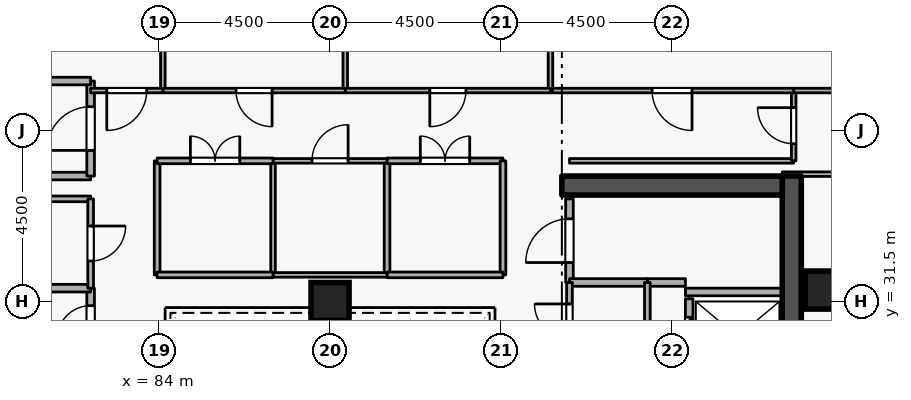
"""IFC4 building model, lengths in metres.
Left out: names, types, materials, properties, quantities, classifications, styles, units other than length and angle.
Written with IfcOpenShell. Run it as: python <this file> out.ifc"""

import sys

from ifc_helpers import new_model, si_unit, direction, frame, frame_2d, origin, origin_2d, place, context, subcontext, project, spatial, rectangle, extrude, element, fill, save


model = new_model("IFC4")
c1 = context("Model", 3, precision=1e-05, world=origin(), true_north=direction((0.0, 1.0)))
c2 = subcontext(c1, "Body", "Model", "MODEL_VIEW")
j1 = project(units=[si_unit("LENGTHUNIT", "METRE"), si_unit("PLANEANGLEUNIT", "RADIAN")], contexts=[c1])
p1 = place(None, origin())
s1 = spatial("IfcSite", under=j1, at=p1, CompositionType="ELEMENT")
p2 = place(p1, origin())
s2 = spatial("IfcBuilding", under=s1, at=p2, CompositionType="ELEMENT")
p3 = place(p2, frame((0.0, 0.0, 218.1)))
s3 = spatial("IfcBuildingStorey", under=s2, at=p3, CompositionType="ELEMENT", Elevation=218.1)
p4 = place(p3, frame((100.65, 19.2, 0.0), z_axis=(0.0, 0.0, 1.0), x_axis=(0.0, 1.0, 0.0)))
e1 = element("IfcWall", 1, at=p4, inside=s3, PredefinedType="SHEAR", context=c2, shape_type="SweptSolid", body=[
    extrude(rectangle(XDim=15.6, YDim=0.5, at=frame_2d((7.8, 0.0))), origin(), (0.0, 0.0, 1.0), 3.6),
])
p5 = place(p3, frame((94.6, 34.55, 0.0), z_axis=(0.0, 0.0, 1.0), x_axis=(1.0, 0.0, 0.0)))
e2 = element("IfcWall", 2, at=p5, inside=s3, PredefinedType="SHEAR", context=c2, shape_type="SweptSolid", body=[
    extrude(rectangle(XDim=5.8, YDim=0.5, at=frame_2d((2.9, 0.0))), origin(), (0.0, 0.0, 1.0), 3.6),
])
for number, where, z_axis, x_axis in (
    (3, (101.5, 31.8, 0.0), (0.0, 0.0, 1.0), (1.0, 0.0, 0.0)),
    (4, (88.5, 31.5, 0.0), (0.0, 0.0, 1.0), (1.0, 0.0, 0.0)),
):
    element("IfcColumn", number, at=place(p3, frame(where, z_axis=z_axis, x_axis=x_axis)), inside=s3, PredefinedType="COLUMN", context=c2, shape_type="SweptSolid", body=[
        extrude(rectangle(XDim=1.0, YDim=1.0, at=origin_2d()), origin(), (0.0, 0.0, 1.0), 3.6),
    ])
p6 = place(p3, frame((97.95, 31.57, 0.0), z_axis=(0.0, 0.0, 1.0), x_axis=(0.0, -1.0, 0.0)))
e5 = element("IfcWall", 5, at=p6, inside=s3, PredefinedType="STANDARD", context=c2, shape_type="SweptSolid", body=[
    extrude(rectangle(XDim=1.99, YDim=0.2, at=frame_2d((0.995, 0.0))), origin(), (0.0, 0.0, 1.0), 3.26),
])
p7 = place(p6, frame((0.485, 0.0, 0.0)))
e6 = element("IfcOpeningElement", 6, at=p7, cuts=e5, PredefinedType="OPENING", context=c2, shape_type="SweptSolid", body=[
    extrude(rectangle(XDim=1.02, YDim=2.06, at=frame_2d((0.51, 1.03))), frame((0.0, 0.11, 0.0), z_axis=(0.0, -1.0, 0.0), x_axis=(1.0, 0.0, 0.0)), (0.0, 0.0, 1.0), 0.22),
])
p8 = place(p3, frame((97.852, 31.75, 0.0), z_axis=(0.0, 0.0, 1.0), x_axis=(1.0, 0.0, 0.0)))
e7 = element("IfcWall", 7, at=p8, inside=s3, PredefinedType="STANDARD", context=c2, shape_type="SweptSolid", body=[
    extrude(rectangle(XDim=2.536, YDim=0.2, at=frame_2d((1.268, 0.0))), origin(), (0.0, 0.0, 1.0), 3.26),
])
p9 = place(p3, frame((79.9, 34.8, 0.0), z_axis=(0.0, 0.0, 1.0), x_axis=(1.0, 0.0, 0.0)))
e8 = element("IfcWall", 8, at=p9, inside=s3, PredefinedType="STANDARD", context=c2, shape_type="SweptSolid", body=[
    extrude(rectangle(XDim=2.3, YDim=0.2, at=frame_2d((1.15, 0.0))), origin(), (0.0, 0.0, 1.0), 2.465),
])
p10 = place(p3, frame((82.2, 34.8, 0.0), z_axis=(0.0, 0.0, 1.0), x_axis=(0.0, 1.0, 0.0)))
e9 = element("IfcWall", 9, at=p10, inside=s3, PredefinedType="STANDARD", context=c2, shape_type="SweptSolid", body=[
    extrude(rectangle(XDim=2.5, YDim=0.2, at=frame_2d((1.25, 0.0))), origin(), (0.0, 0.0, 1.0), 3.26),
])
p11 = place(p10, frame((0.675, 0.0, 0.0)))
e10 = element("IfcOpeningElement", 10, at=p11, cuts=e9, PredefinedType="OPENING", context=c2, shape_type="SweptSolid", body=[
    extrude(rectangle(XDim=1.15, YDim=2.1, at=frame_2d((0.575, 1.05))), frame((0.0, 0.11, 0.0), z_axis=(0.0, -1.0, 0.0), x_axis=(1.0, 0.0, 0.0)), (0.0, 0.0, 1.0), 0.22),
])
p12 = place(p3, frame((82.2, 37.3, 0.0), z_axis=(0.0, 0.0, 1.0), x_axis=(-1.0, 0.0, 0.0)))
e11 = element("IfcWall", 11, at=p12, inside=s3, PredefinedType="STANDARD", context=c2, shape_type="SweptSolid", body=[
    extrude(rectangle(XDim=5.7, YDim=0.2, at=frame_2d((2.85, 0.0))), origin(), (0.0, 0.0, 1.0), 3.26),
])
p13 = place(p3, frame((82.2, 30.05, 0.0), z_axis=(0.0, 0.0, 1.0), x_axis=(0.0, 1.0, 0.0)))
e12 = element("IfcWall", 12, at=p13, inside=s3, PredefinedType="STANDARD", context=c2, shape_type="SweptSolid", body=[
    extrude(rectangle(XDim=1.8, YDim=0.2, at=frame_2d((0.9, 0.0))), origin(), (0.0, 0.0, 1.0), 3.26),
])
p14 = place(p13, frame((0.46, 0.0, 0.0)))
e13 = element("IfcOpeningElement", 13, at=p14, cuts=e12, PredefinedType="OPENING", context=c2, shape_type="SweptSolid", body=[
    extrude(rectangle(XDim=0.88, YDim=2.04, at=frame_2d((0.44, 1.02))), frame((0.0, 0.11, 0.0), z_axis=(0.0, -1.0, 0.0), x_axis=(1.0, 0.0, 0.0)), (0.0, 0.0, 1.0), 0.22),
])
p15 = place(p3, frame((82.2, 31.85, 0.0), z_axis=(0.0, 0.0, 1.0), x_axis=(-1.0, 0.0, 0.0)))
e14 = element("IfcWall", 14, at=p15, inside=s3, PredefinedType="STANDARD", context=c2, shape_type="SweptSolid", body=[
    extrude(rectangle(XDim=2.05, YDim=0.2, at=frame_2d((1.025, 0.0))), origin(), (0.0, 0.0, 1.0), 3.26),
])
p16 = place(p3, frame((94.8, 32.0, 0.0), z_axis=(0.0, 0.0, 1.0), x_axis=(0.0, 1.0, 0.0)))
e15 = element("IfcWall", 15, at=p16, inside=s3, PredefinedType="STANDARD", context=c2, shape_type="SweptSolid", body=[
    extrude(rectangle(XDim=2.2, YDim=0.2, at=frame_2d((1.1, 0.0))), origin(), (0.0, 0.0, 1.0), 3.26),
])
p17 = place(p16, frame((0.525, 0.0, 0.0)))
e16 = element("IfcOpeningElement", 16, at=p17, cuts=e15, PredefinedType="OPENING", context=c2, shape_type="SweptSolid", body=[
    extrude(rectangle(XDim=1.15, YDim=2.1, at=frame_2d((0.575, 1.05))), frame((0.0, 0.11, 0.0), z_axis=(0.0, -1.0, 0.0), x_axis=(1.0, 0.0, 0.0)), (0.0, 0.0, 1.0), 0.22),
])
p18 = place(p3, frame((97.852, 32.0, 0.0), z_axis=(0.0, 0.0, 1.0), x_axis=(-1.0, 0.0, 0.0)))
e17 = element("IfcWall", 17, at=p18, inside=s3, PredefinedType="STANDARD", context=c2, shape_type="SweptSolid", body=[
    extrude(rectangle(XDim=1.002, YDim=0.2, at=frame_2d((0.501, 0.0))), origin(), (0.0, 0.0, 1.0), 3.26),
])
p19 = place(p3, frame((96.85, 32.0, 0.0), z_axis=(0.0, 0.0, 1.0), x_axis=(-1.0, 0.0, 0.0)))
e18 = element("IfcWall", 18, at=p19, inside=s3, PredefinedType="STANDARD", context=c2, shape_type="SweptSolid", body=[
    extrude(rectangle(XDim=2.05, YDim=0.2, at=frame_2d((1.025, 0.0))), origin(), (0.0, 0.0, 1.0), 3.26),
])
p20 = place(p3, frame((94.8, 29.95, 0.0), z_axis=(0.0, 0.0, 1.0), x_axis=(0.0, 1.0, 0.0)))
e19 = element("IfcWall", 19, at=p20, inside=s3, PredefinedType="PARTITIONING", context=c2, shape_type="SweptSolid", body=[
    extrude(rectangle(XDim=2.05, YDim=0.15, at=frame_2d((1.025, 0.0))), origin(), (0.0, 0.0, 1.0), 3.26),
])
p21 = place(p20, frame((0.565, 0.0, 0.0)))
e20 = element("IfcOpeningElement", 20, at=p21, cuts=e19, PredefinedType="OPENING", context=c2, shape_type="SweptSolid", body=[
    extrude(rectangle(XDim=0.92, YDim=2.08, at=frame_2d((0.46, 1.04))), frame((0.0, 0.085, 0.0), z_axis=(0.0, -1.0, 0.0), x_axis=(1.0, 0.0, 0.0)), (0.0, 0.0, 1.0), 0.17),
])
p22 = place(p3, frame((96.85, 32.0, 0.0), z_axis=(0.0, 0.0, 1.0), x_axis=(0.0, -1.0, 0.0)))
e21 = element("IfcWall", 21, at=p22, inside=s3, PredefinedType="PARTITIONING", context=c2, shape_type="SweptSolid", body=[
    extrude(rectangle(XDim=2.05, YDim=0.15, at=frame_2d((1.025, 0.0))), origin(), (0.0, 0.0, 1.0), 3.26),
])
p23 = place(p3, frame((80.15, 34.2, 0.0), z_axis=(0.0, 0.0, 1.0), x_axis=(1.0, 0.0, 0.0)))
e22 = element("IfcWall", 22, at=p23, inside=s3, PredefinedType="PARTITIONING", context=c2, shape_type="SweptSolid", body=[
    extrude(rectangle(XDim=2.05, YDim=0.15, at=frame_2d((1.025, 0.0))), origin(), (0.0, 0.0, 1.0), 2.465),
])
p24 = place(p3, frame((82.2, 34.2, 0.0), z_axis=(0.0, 0.0, 1.0), x_axis=(0.0, -1.0, 0.0)))
e23 = element("IfcWall", 23, at=p24, inside=s3, PredefinedType="PARTITIONING", context=c2, shape_type="SweptSolid", body=[
    extrude(rectangle(XDim=2.35, YDim=0.15, at=frame_2d((1.175, 0.0))), origin(), (0.0, 0.0, 1.0), 3.26),
])
p25 = place(p24, frame((0.715, 0.0, 0.0)))
e24 = element("IfcOpeningElement", 24, at=p25, cuts=e23, PredefinedType="OPENING", context=c2, shape_type="SweptSolid", body=[
    extrude(rectangle(XDim=0.92, YDim=2.08, at=frame_2d((0.46, 1.04))), frame((0.0, 0.085, 0.0), z_axis=(0.0, -1.0, 0.0), x_axis=(1.0, 0.0, 0.0)), (0.0, 0.0, 1.0), 0.17),
])
p26 = place(p3, frame((94.8, 35.2, 0.0), z_axis=(0.0, 0.0, 1.0), x_axis=(1.0, 0.0, 0.0)))
e25 = element("IfcWall", 25, at=p26, inside=s3, PredefinedType="PARTITIONING", context=c2, shape_type="SweptSolid", body=[
    extrude(rectangle(XDim=5.9, YDim=0.12, at=frame_2d((2.95, 0.0))), origin(), (0.0, 0.0, 1.0), 3.26),
])
p27 = place(p3, frame((100.7, 35.2, 0.0), z_axis=(0.0, 0.0, 1.0), x_axis=(0.0, 1.0, 0.0)))
e26 = element("IfcWall", 26, at=p27, inside=s3, PredefinedType="PARTITIONING", context=c2, shape_type="SweptSolid", body=[
    extrude(rectangle(XDim=1.85, YDim=0.12, at=frame_2d((0.925, 0.0))), origin(), (0.0, 0.0, 1.0), 3.26),
])
p28 = place(p27, frame((0.45, 0.0, 0.0)))
e27 = element("IfcOpeningElement", 27, at=p28, cuts=e26, PredefinedType="OPENING", context=c2, shape_type="SweptSolid", body=[
    extrude(rectangle(XDim=0.95, YDim=2.1, at=frame_2d((0.475, 1.05))), frame((0.0, 0.07, 0.0), z_axis=(0.0, -1.0, 0.0), x_axis=(1.0, 0.0, 0.0)), (0.0, 0.0, 1.0), 0.14),
])
p29 = place(p3, frame((100.7, 37.05, 0.0), z_axis=(0.0, 0.0, 1.0), x_axis=(1.0, 0.0, 0.0)))
e28 = element("IfcWall", 28, at=p29, inside=s3, PredefinedType="PARTITIONING", context=c2, shape_type="SweptSolid", body=[
    extrude(rectangle(XDim=5.52, YDim=0.12, at=frame_2d((2.76, 0.0))), origin(), (0.0, 0.0, 1.0), 3.26),
])
p30 = place(p3, frame((106.22, 34.85, 0.0), z_axis=(0.0, 0.0, 1.0), x_axis=(-1.0, 0.0, 0.0)))
e29 = element("IfcWall", 29, at=p30, inside=s3, PredefinedType="PARTITIONING", context=c2, shape_type="SweptSolid", body=[
    extrude(rectangle(XDim=5.82, YDim=0.12, at=frame_2d((2.91, 0.0))), origin(), (0.0, 0.0, 1.0), 2.465),
])
p31 = place(p3, frame((100.7, 37.05, 0.0), z_axis=(0.0, 0.0, 1.0), x_axis=(-1.0, 0.0, 0.0)))
e30 = element("IfcWall", 30, at=p31, inside=s3, PredefinedType="PARTITIONING", context=c2, shape_type="SweptSolid", body=[
    extrude(rectangle(XDim=6.4, YDim=0.12, at=frame_2d((3.2, 0.0))), origin(), (0.0, 0.0, 1.0), 3.26),
])
p32 = place(p31, frame((2.675, 0.0, 0.0)))
e31 = element("IfcOpeningElement", 31, at=p32, cuts=e30, PredefinedType="OPENING", context=c2, shape_type="SweptSolid", body=[
    extrude(rectangle(XDim=1.05, YDim=2.1, at=frame_2d((0.525, 1.05))), frame((0.0, 0.07, 0.0), z_axis=(0.0, -1.0, 0.0), x_axis=(1.0, 0.0, 0.0)), (0.0, 0.0, 1.0), 0.14),
])
for number, where, z_axis, x_axis in (
    (32, (94.3, 37.05, 0.0), (0.0, 0.0, 1.0), (0.0, 1.0, 0.0)),
    (33, (88.9, 37.05, 0.0), (0.0, 0.0, 1.0), (0.0, 1.0, 0.0)),
):
    element("IfcWall", number, at=place(p3, frame(where, z_axis=z_axis, x_axis=x_axis)), inside=s3, PredefinedType="PARTITIONING", context=c2, shape_type="SweptSolid", body=[
        extrude(rectangle(XDim=7.67, YDim=0.12, at=frame_2d((3.835, 0.0))), origin(), (0.0, 0.0, 1.0), 3.26),
    ])
p33 = place(p3, frame((94.3, 37.05, 0.0), z_axis=(0.0, 0.0, 1.0), x_axis=(-1.0, 0.0, 0.0)))
e34 = element("IfcWall", 34, at=p33, inside=s3, PredefinedType="PARTITIONING", context=c2, shape_type="SweptSolid", body=[
    extrude(rectangle(XDim=5.4, YDim=0.12, at=frame_2d((2.7, 0.0))), origin(), (0.0, 0.0, 1.0), 3.26),
])
p34 = place(p33, frame((2.225, 0.0, 0.0)))
e35 = element("IfcOpeningElement", 35, at=p34, cuts=e34, PredefinedType="OPENING", context=c2, shape_type="SweptSolid", body=[
    extrude(rectangle(XDim=0.95, YDim=2.1, at=frame_2d((0.475, 1.05))), frame((0.0, 0.07, 0.0), z_axis=(0.0, -1.0, 0.0), x_axis=(1.0, 0.0, 0.0)), (0.0, 0.0, 1.0), 0.14),
])
p35 = place(p3, frame((84.1, 37.05, 0.0), z_axis=(0.0, 0.0, 1.0), x_axis=(0.0, 1.0, 0.0)))
e36 = element("IfcWall", 36, at=p35, inside=s3, PredefinedType="PARTITIONING", context=c2, shape_type="SweptSolid", body=[
    extrude(rectangle(XDim=7.67, YDim=0.12, at=frame_2d((3.835, 0.0))), origin(), (0.0, 0.0, 1.0), 3.26),
])
p36 = place(p3, frame((88.9, 37.05, 0.0), z_axis=(0.0, 0.0, 1.0), x_axis=(-1.0, 0.0, 0.0)))
e37 = element("IfcWall", 37, at=p36, inside=s3, PredefinedType="PARTITIONING", context=c2, shape_type="SweptSolid", body=[
    extrude(rectangle(XDim=4.8, YDim=0.12, at=frame_2d((2.4, 0.0))), origin(), (0.0, 0.0, 1.0), 3.26),
])
p37 = place(p36, frame((1.925, 0.0, 0.0)))
e38 = element("IfcOpeningElement", 38, at=p37, cuts=e37, PredefinedType="OPENING", context=c2, shape_type="SweptSolid", body=[
    extrude(rectangle(XDim=0.95, YDim=2.1, at=frame_2d((0.475, 1.05))), frame((0.0, 0.07, 0.0), z_axis=(0.0, -1.0, 0.0), x_axis=(1.0, 0.0, 0.0)), (0.0, 0.0, 1.0), 0.14),
])
p38 = place(p3, frame((84.1, 37.05, 0.0), z_axis=(0.0, 0.0, 1.0), x_axis=(-1.0, 0.0, 0.0)))
e39 = element("IfcWall", 39, at=p38, inside=s3, PredefinedType="PARTITIONING", context=c2, shape_type="SweptSolid", body=[
    extrude(rectangle(XDim=1.9, YDim=0.12, at=frame_2d((0.95, 0.0))), origin(), (0.0, 0.0, 1.0), 3.26),
])
p39 = place(p38, frame((0.425, 0.0, 0.0)))
e40 = element("IfcOpeningElement", 40, at=p39, cuts=e39, PredefinedType="OPENING", context=c2, shape_type="SweptSolid", body=[
    extrude(rectangle(XDim=1.05, YDim=2.1, at=frame_2d((0.525, 1.05))), frame((0.0, 0.07, 0.0), z_axis=(0.0, -1.0, 0.0), x_axis=(1.0, 0.0, 0.0)), (0.0, 0.0, 1.0), 0.14),
])
p40 = place(p3, frame((90.0, 32.2, 0.0), z_axis=(0.0, 0.0, 1.0), x_axis=(0.0, 1.0, 0.0)))
e41 = element("IfcWall", 41, at=p40, inside=s3, PredefinedType="PARTITIONING", context=c2, shape_type="SweptSolid", body=[
    extrude(rectangle(XDim=3.0, YDim=0.15, at=frame_2d((1.5, 0.0))), origin(), (0.0, 0.0, 1.0), 3.26),
])
p41 = place(p3, frame((90.0, 35.2, 0.0), z_axis=(0.0, 0.0, 1.0), x_axis=(1.0, 0.0, 0.0)))
e42 = element("IfcWall", 42, at=p41, inside=s3, PredefinedType="PARTITIONING", context=c2, shape_type="SweptSolid", body=[
    extrude(rectangle(XDim=3.05, YDim=0.15, at=frame_2d((1.525, 0.0))), origin(), (0.0, 0.0, 1.0), 3.26),
])
p42 = place(p41, frame((0.875, 0.0, 0.0)))
e43 = element("IfcOpeningElement", 43, at=p42, cuts=e42, PredefinedType="OPENING", context=c2, shape_type="SweptSolid", body=[
    extrude(rectangle(XDim=1.3, YDim=2.12, at=frame_2d((0.65, 1.06))), frame((0.0, 0.085, 0.0), z_axis=(0.0, -1.0, 0.0), x_axis=(1.0, 0.0, 0.0)), (0.0, 0.0, 1.0), 0.17),
])
p43 = place(p3, frame((93.05, 35.2, 0.0), z_axis=(0.0, 0.0, 1.0), x_axis=(0.0, -1.0, 0.0)))
e44 = element("IfcWall", 44, at=p43, inside=s3, PredefinedType="PARTITIONING", context=c2, shape_type="SweptSolid", body=[
    extrude(rectangle(XDim=3.0, YDim=0.15, at=frame_2d((1.5, 0.0))), origin(), (0.0, 0.0, 1.0), 3.26),
])
p44 = place(p3, frame((93.05, 32.2, 0.0), z_axis=(0.0, 0.0, 1.0), x_axis=(-1.0, 0.0, 0.0)))
e45 = element("IfcWall", 45, at=p44, inside=s3, PredefinedType="PARTITIONING", context=c2, shape_type="SweptSolid", body=[
    extrude(rectangle(XDim=3.05, YDim=0.15, at=frame_2d((1.525, 0.0))), origin(), (0.0, 0.0, 1.0), 3.26),
])
p45 = place(p3, frame((87.0, 32.2, 0.0), z_axis=(0.0, 0.0, 1.0), x_axis=(0.0, 1.0, 0.0)))
e46 = element("IfcWall", 46, at=p45, inside=s3, PredefinedType="PARTITIONING", context=c2, shape_type="SweptSolid", body=[
    extrude(rectangle(XDim=3.0, YDim=0.12, at=frame_2d((1.5, 0.0))), origin(), (0.0, 0.0, 1.0), 3.26),
])
p46 = place(p3, frame((87.0, 35.2, 0.0), z_axis=(0.0, 0.0, 1.0), x_axis=(1.0, 0.0, 0.0)))
e47 = element("IfcWall", 47, at=p46, inside=s3, PredefinedType="PARTITIONING", context=c2, shape_type="SweptSolid", body=[
    extrude(rectangle(XDim=3.0, YDim=0.12, at=frame_2d((1.5, 0.0))), origin(), (0.0, 0.0, 1.0), 3.26),
])
p47 = place(p46, frame((1.025, 0.0, 0.0)))
e48 = element("IfcOpeningElement", 48, at=p47, cuts=e47, PredefinedType="OPENING", context=c2, shape_type="SweptSolid", body=[
    extrude(rectangle(XDim=0.95, YDim=2.1, at=frame_2d((0.475, 1.05))), frame((0.0, 0.07, 0.0), z_axis=(0.0, -1.0, 0.0), x_axis=(1.0, 0.0, 0.0)), (0.0, 0.0, 1.0), 0.14),
])
p48 = place(p3, frame((90.0, 32.2, 0.0), z_axis=(0.0, 0.0, 1.0), x_axis=(-1.0, 0.0, 0.0)))
e49 = element("IfcWall", 49, at=p48, inside=s3, PredefinedType="PARTITIONING", context=c2, shape_type="SweptSolid", body=[
    extrude(rectangle(XDim=3.0, YDim=0.12, at=frame_2d((1.5, 0.0))), origin(), (0.0, 0.0, 1.0), 3.26),
])
p49 = place(p3, frame((83.95, 32.2, 0.0), z_axis=(0.0, 0.0, 1.0), x_axis=(0.0, 1.0, 0.0)))
e50 = element("IfcWall", 50, at=p49, inside=s3, PredefinedType="PARTITIONING", context=c2, shape_type="SweptSolid", body=[
    extrude(rectangle(XDim=3.0, YDim=0.15, at=frame_2d((1.5, 0.0))), origin(), (0.0, 0.0, 1.0), 3.26),
])
p50 = place(p3, frame((83.95, 35.2, 0.0), z_axis=(0.0, 0.0, 1.0), x_axis=(1.0, 0.0, 0.0)))
e51 = element("IfcWall", 51, at=p50, inside=s3, PredefinedType="PARTITIONING", context=c2, shape_type="SweptSolid", body=[
    extrude(rectangle(XDim=3.05, YDim=0.15, at=frame_2d((1.525, 0.0))), origin(), (0.0, 0.0, 1.0), 3.26),
])
p51 = place(p50, frame((0.875, 0.0, 0.0)))
e52 = element("IfcOpeningElement", 52, at=p51, cuts=e51, PredefinedType="OPENING", context=c2, shape_type="SweptSolid", body=[
    extrude(rectangle(XDim=1.3, YDim=2.12, at=frame_2d((0.65, 1.06))), frame((0.0, 0.085, 0.0), z_axis=(0.0, -1.0, 0.0), x_axis=(1.0, 0.0, 0.0)), (0.0, 0.0, 1.0), 0.17),
])
p52 = place(p3, frame((87.0, 32.2, 0.0), z_axis=(0.0, 0.0, 1.0), x_axis=(-1.0, 0.0, 0.0)))
e53 = element("IfcWall", 53, at=p52, inside=s3, PredefinedType="PARTITIONING", context=c2, shape_type="SweptSolid", body=[
    extrude(rectangle(XDim=3.05, YDim=0.15, at=frame_2d((1.525, 0.0))), origin(), (0.0, 0.0, 1.0), 3.26),
])
p53 = place(p7, origin())
e54 = element("IfcDoor", 54, at=p53, inside=s3, OperationType="SLIDING_TO_LEFT", PredefinedType="DOOR", context=c2, shape_type="SweptSolid", body=[
    extrude(rectangle(XDim=1.02, YDim=2.06, at=frame_2d((0.51, 1.03))), frame((0.0, 0.025, 0.0), z_axis=(0.0, -1.0, 0.0), x_axis=(1.0, 0.0, 0.0)), (0.0, 0.0, 1.0), 0.05),
])
fill(e6, e54)
p54 = place(p11, origin())
e55 = element("IfcDoor", 55, at=p54, inside=s3, OperationType="SINGLE_SWING_LEFT", PredefinedType="DOOR", context=c2, shape_type="SweptSolid", body=[
    extrude(rectangle(XDim=1.15, YDim=2.1, at=frame_2d((0.575, 1.05))), frame((0.0, 0.025, 0.0), z_axis=(0.0, -1.0, 0.0), x_axis=(1.0, 0.0, 0.0)), (0.0, 0.0, 1.0), 0.05),
])
fill(e10, e55)
p55 = place(p14, origin())
e56 = element("IfcDoor", 56, at=p55, inside=s3, OperationType="SINGLE_SWING_LEFT", PredefinedType="DOOR", context=c2, shape_type="SweptSolid", body=[
    extrude(rectangle(XDim=0.88, YDim=2.04, at=frame_2d((0.44, 1.02))), frame((0.0, 0.025, 0.0), z_axis=(0.0, -1.0, 0.0), x_axis=(1.0, 0.0, 0.0)), (0.0, 0.0, 1.0), 0.05),
])
fill(e13, e56)
p56 = place(p21, origin())
e57 = element("IfcDoor", 57, at=p56, inside=s3, OperationType="SINGLE_SWING_RIGHT", PredefinedType="DOOR", context=c2, shape_type="SweptSolid", body=[
    extrude(rectangle(XDim=0.92, YDim=2.08, at=frame_2d((0.46, 1.04))), frame((0.0, 0.025, 0.0), z_axis=(0.0, -1.0, 0.0), x_axis=(1.0, 0.0, 0.0)), (0.0, 0.0, 1.0), 0.05),
])
fill(e20, e57)
p57 = place(p17, origin())
e58 = element("IfcDoor", 58, at=p57, inside=s3, OperationType="SINGLE_SWING_LEFT", PredefinedType="DOOR", context=c2, shape_type="SweptSolid", body=[
    extrude(rectangle(XDim=1.15, YDim=2.1, at=frame_2d((0.575, 1.05))), frame((0.0, 0.025, 0.0), z_axis=(0.0, -1.0, 0.0), x_axis=(1.0, 0.0, 0.0)), (0.0, 0.0, 1.0), 0.05),
])
fill(e16, e58)
p58 = place(p25, origin())
e59 = element("IfcDoor", 59, at=p58, inside=s3, OperationType="SINGLE_SWING_LEFT", PredefinedType="DOOR", context=c2, shape_type="SweptSolid", body=[
    extrude(rectangle(XDim=0.92, YDim=2.08, at=frame_2d((0.46, 1.04))), frame((0.0, 0.025, 0.0), z_axis=(0.0, -1.0, 0.0), x_axis=(1.0, 0.0, 0.0)), (0.0, 0.0, 1.0), 0.05),
])
fill(e24, e59)
p59 = place(p28, origin())
e60 = element("IfcDoor", 60, at=p59, inside=s3, OperationType="SINGLE_SWING_RIGHT", PredefinedType="DOOR", context=c2, shape_type="SweptSolid", body=[
    extrude(rectangle(XDim=0.95, YDim=2.1, at=frame_2d((0.475, 1.05))), frame((0.0, 0.025, 0.0), z_axis=(0.0, -1.0, 0.0), x_axis=(1.0, 0.0, 0.0)), (0.0, 0.0, 1.0), 0.05),
])
fill(e27, e60)
p60 = place(p32, origin())
e61 = element("IfcDoor", 61, at=p60, inside=s3, OperationType="SINGLE_SWING_LEFT", PredefinedType="DOOR", context=c2, shape_type="SweptSolid", body=[
    extrude(rectangle(XDim=1.05, YDim=2.1, at=frame_2d((0.525, 1.05))), frame((0.0, 0.025, 0.0), z_axis=(0.0, -1.0, 0.0), x_axis=(1.0, 0.0, 0.0)), (0.0, 0.0, 1.0), 0.05),
])
fill(e31, e61)
p61 = place(p34, origin())
e62 = element("IfcDoor", 62, at=p61, inside=s3, OperationType="SINGLE_SWING_RIGHT", PredefinedType="DOOR", context=c2, shape_type="SweptSolid", body=[
    extrude(rectangle(XDim=0.95, YDim=2.1, at=frame_2d((0.475, 1.05))), frame((0.0, 0.025, 0.0), z_axis=(0.0, -1.0, 0.0), x_axis=(1.0, 0.0, 0.0)), (0.0, 0.0, 1.0), 0.05),
])
fill(e35, e62)
p62 = place(p37, origin())
e63 = element("IfcDoor", 63, at=p62, inside=s3, OperationType="SINGLE_SWING_LEFT", PredefinedType="DOOR", context=c2, shape_type="SweptSolid", body=[
    extrude(rectangle(XDim=0.95, YDim=2.1, at=frame_2d((0.475, 1.05))), frame((0.0, 0.025, 0.0), z_axis=(0.0, -1.0, 0.0), x_axis=(1.0, 0.0, 0.0)), (0.0, 0.0, 1.0), 0.05),
])
fill(e38, e63)
p63 = place(p39, origin())
e64 = element("IfcDoor", 64, at=p63, inside=s3, OperationType="SINGLE_SWING_RIGHT", PredefinedType="DOOR", context=c2, shape_type="SweptSolid", body=[
    extrude(rectangle(XDim=1.05, YDim=2.1, at=frame_2d((0.525, 1.05))), frame((0.0, 0.025, 0.0), z_axis=(0.0, -1.0, 0.0), x_axis=(1.0, 0.0, 0.0)), (0.0, 0.0, 1.0), 0.05),
])
fill(e40, e64)
p64 = place(p42, origin())
e65 = element("IfcDoor", 65, at=p64, inside=s3, OperationType="DOUBLE_DOOR_SINGLE_SWING", PredefinedType="DOOR", context=c2, shape_type="SweptSolid", body=[
    extrude(rectangle(XDim=1.3, YDim=2.12, at=frame_2d((0.65, 1.06))), frame((0.0, 0.025, 0.0), z_axis=(0.0, -1.0, 0.0), x_axis=(1.0, 0.0, 0.0)), (0.0, 0.0, 1.0), 0.05),
])
fill(e43, e65)
p65 = place(p47, origin())
e66 = element("IfcDoor", 66, at=p65, inside=s3, OperationType="SINGLE_SWING_RIGHT", PredefinedType="DOOR", context=c2, shape_type="SweptSolid", body=[
    extrude(rectangle(XDim=0.95, YDim=2.1, at=frame_2d((0.475, 1.05))), frame((0.0, 0.025, 0.0), z_axis=(0.0, -1.0, 0.0), x_axis=(1.0, 0.0, 0.0)), (0.0, 0.0, 1.0), 0.05),
])
fill(e48, e66)
p66 = place(p51, origin())
e67 = element("IfcDoor", 67, at=p66, inside=s3, OperationType="DOUBLE_DOOR_SINGLE_SWING", PredefinedType="DOOR", context=c2, shape_type="SweptSolid", body=[
    extrude(rectangle(XDim=1.3, YDim=2.12, at=frame_2d((0.65, 1.06))), frame((0.0, 0.025, 0.0), z_axis=(0.0, -1.0, 0.0), x_axis=(1.0, 0.0, 0.0)), (0.0, 0.0, 1.0), 0.05),
])
fill(e52, e67)
save(model, sys.argv[1])
